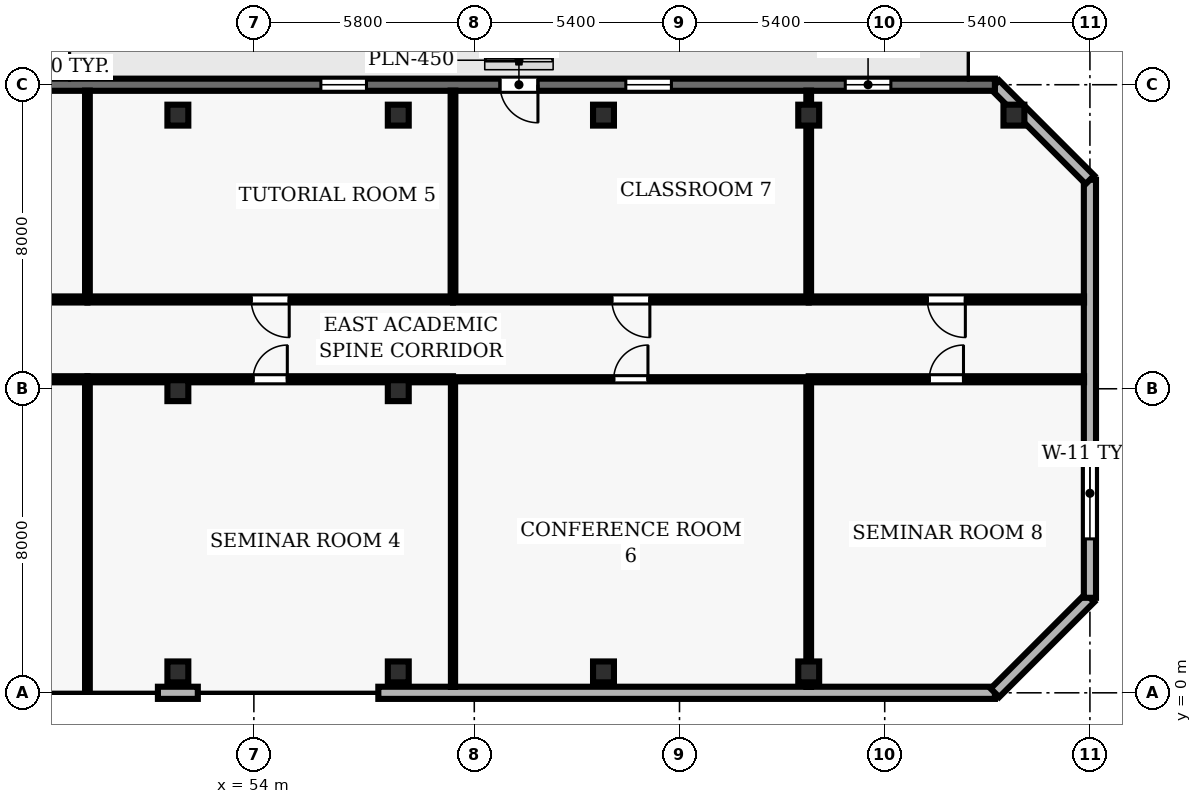
"""IFC4 building model, lengths in metres.
Left out: names, types, materials, properties, quantities, classifications, styles, units other than length and angle.
Written with IfcOpenShell. Run it as: python <this file> out.ifc"""

import sys

from ifc_helpers import new_model, si_unit, direction, frame, frame_2d, origin, origin_2d, place, context, subcontext, project, spatial, rectangle, hollow_rectangle, extrude, element, fill, save


model = new_model("IFC4")
c1 = context("Model", 3, precision=1e-05, world=origin(), true_north=direction((0.0, 1.0)))
c2 = subcontext(c1, "Body", "Model", "MODEL_VIEW")
j1 = project(units=[si_unit("LENGTHUNIT", "METRE"), si_unit("PLANEANGLEUNIT", "RADIAN")], contexts=[c1])
p1 = place(None, origin())
s1 = spatial("IfcSite", under=j1, at=p1, CompositionType="ELEMENT")
p2 = place(p1, origin())
s2 = spatial("IfcBuilding", under=s1, at=p2, CompositionType="ELEMENT")
p3 = place(p2, frame((0.0, 0.0, 85.6)))
s3 = spatial("IfcBuildingStorey", under=s2, at=p3, CompositionType="ELEMENT", Elevation=85.6)
for number, where, z_axis, x_axis in (
    (1, (52.0, 0.55, 0.0), (0.0, 0.0, 1.0), (1.0, 0.0, 0.0)),
    (2, (52.0, 7.95, 0.0), (0.0, 0.0, 1.0), (1.0, 0.0, 0.0)),
    (3, (52.0, 15.2, 0.0), (0.0, 0.0, 1.0), (1.0, 0.0, 0.0)),
    (4, (57.8, 0.55, 0.0), (0.0, 0.0, 1.0), (1.0, 0.0, 0.0)),
    (5, (57.8, 7.95, 0.0), (0.0, 0.0, 1.0), (1.0, 0.0, 0.0)),
    (6, (57.8, 15.2, 0.0), (0.0, 0.0, 1.0), (1.0, 0.0, 0.0)),
    (7, (63.2, 0.55, 0.0), (0.0, 0.0, 1.0), (1.0, 0.0, 0.0)),
    (8, (63.2, 15.2, 0.0), (0.0, 0.0, 1.0), (1.0, 0.0, 0.0)),
    (9, (68.6, 0.55, 0.0), (0.0, 0.0, 1.0), (1.0, 0.0, 0.0)),
    (10, (68.6, 15.2, 0.0), (0.0, 0.0, 1.0), (1.0, 0.0, 0.0)),
    (11, (74.0, 15.2, 0.0), (0.0, 0.0, 1.0), (1.0, 0.0, 0.0)),
):
    element("IfcColumn", number, at=place(p3, frame(where, z_axis=z_axis, x_axis=x_axis)), inside=s3, PredefinedType="COLUMN", context=c2, shape_type="SweptSolid", body=[
        extrude(hollow_rectangle(XDim=0.55, YDim=0.55, WallThickness=0.025, at=origin_2d()), origin(), (0.0, 0.0, 1.0), 3.9),
    ])
p4 = place(p3, frame((51.475, 0.0, 0.0), z_axis=(0.0, 0.0, 1.0), x_axis=(1.0, 0.0, 0.0)))
e12 = element("IfcWall", 12, at=p4, inside=s3, PredefinedType="SOLIDWALL", context=c2, shape_type="SweptSolid", body=[
    extrude(rectangle(XDim=1.05, YDim=0.32, at=frame_2d((0.525, 0.0))), origin(), (0.0, 0.0, 1.0), 3.69),
])
p5 = place(p3, frame((57.275, 0.0, 0.0), z_axis=(0.0, 0.0, 1.0), x_axis=(1.0, 0.0, 0.0)))
e13 = element("IfcWall", 13, at=p5, inside=s3, PredefinedType="SOLIDWALL", context=c2, shape_type="SweptSolid", body=[
    extrude(rectangle(XDim=16.225, YDim=0.32, at=frame_2d((8.113, 0.0))), origin(), (0.0, 0.0, 1.0), 3.69),
])
p6 = place(p3, frame((73.5, 0.0, 0.0), z_axis=(0.0, 0.0, 1.0), x_axis=(0.707106781187, 0.707106781187, 0.0)))
e14 = element("IfcWall", 14, at=p6, inside=s3, PredefinedType="SOLIDWALL", context=c2, shape_type="SweptSolid", body=[
    extrude(rectangle(XDim=3.536, YDim=0.32, at=frame_2d((1.768, 0.0))), origin(), (0.0, 0.0, 1.0), 3.69),
])
p7 = place(p3, frame((76.0, 2.5, 0.0), z_axis=(0.0, 0.0, 1.0), x_axis=(0.0, 1.0, 0.0)))
e15 = element("IfcWall", 15, at=p7, inside=s3, PredefinedType="SOLIDWALL", context=c2, shape_type="SweptSolid", body=[
    extrude(rectangle(XDim=11.0, YDim=0.32, at=frame_2d((5.5, 0.0))), origin(), (0.0, 0.0, 1.0), 3.69),
])
p8 = place(p7, frame((1.55, 0.0, 0.9)))
e16 = element("IfcOpeningElement", 16, at=p8, cuts=e15, PredefinedType="OPENING", context=c2, shape_type="SweptSolid", body=[
    extrude(rectangle(XDim=2.4, YDim=2.2, at=frame_2d((1.2, 1.1))), frame((0.0, 0.17, 0.0), z_axis=(0.0, -1.0, 0.0), x_axis=(1.0, 0.0, 0.0)), (0.0, 0.0, 1.0), 0.34),
])
p9 = place(p3, frame((76.0, 13.5, 0.0), z_axis=(0.0, 0.0, 1.0), x_axis=(-0.707106781187, 0.707106781187, 0.0)))
e17 = element("IfcWall", 17, at=p9, inside=s3, PredefinedType="SOLIDWALL", context=c2, shape_type="SweptSolid", body=[
    extrude(rectangle(XDim=3.536, YDim=0.32, at=frame_2d((1.768, 0.0))), origin(), (0.0, 0.0, 1.0), 3.69),
])
p10 = place(p3, frame((73.5, 16.0, 0.0), z_axis=(0.0, 0.0, 1.0), x_axis=(-1.0, 0.0, 0.0)))
e18 = element("IfcWall", 18, at=p10, inside=s3, PredefinedType="SOLIDWALL", context=c2, shape_type="SweptSolid", body=[
    extrude(rectangle(XDim=26.7, YDim=0.32, at=frame_2d((13.35, 0.0))), origin(), (0.0, 0.0, 1.0), 3.69),
])
p11 = place(p10, frame((12.025, 0.0, 0.0)))
e19 = element("IfcOpeningElement", 19, at=p11, cuts=e18, PredefinedType="OPENING", context=c2, shape_type="SweptSolid", body=[
    extrude(rectangle(XDim=1.0, YDim=2.2, at=frame_2d((0.5, 1.1))), frame((0.0, 0.17, 0.0), z_axis=(0.0, -1.0, 0.0), x_axis=(1.0, 0.0, 0.0)), (0.0, 0.0, 1.0), 0.34),
])
p12 = place(p10, frame((2.738, 0.0, 0.9)))
e20 = element("IfcOpeningElement", 20, at=p12, cuts=e18, PredefinedType="OPENING", context=c2, shape_type="SweptSolid", body=[
    extrude(rectangle(XDim=1.2, YDim=1.6, at=frame_2d((0.6, 0.8))), frame((0.0, 0.17, 0.0), z_axis=(0.0, -1.0, 0.0), x_axis=(1.0, 0.0, 0.0)), (0.0, 0.0, 1.0), 0.34),
])
p13 = place(p10, frame((8.513, 0.0, 0.9)))
e21 = element("IfcOpeningElement", 21, at=p13, cuts=e18, PredefinedType="OPENING", context=c2, shape_type="SweptSolid", body=[
    extrude(rectangle(XDim=1.2, YDim=1.6, at=frame_2d((0.6, 0.8))), frame((0.0, 0.17, 0.0), z_axis=(0.0, -1.0, 0.0), x_axis=(1.0, 0.0, 0.0)), (0.0, 0.0, 1.0), 0.34),
])
p14 = place(p10, frame((16.537, 0.0, 0.9)))
e22 = element("IfcOpeningElement", 22, at=p14, cuts=e18, PredefinedType="OPENING", context=c2, shape_type="SweptSolid", body=[
    extrude(rectangle(XDim=1.2, YDim=1.6, at=frame_2d((0.6, 0.8))), frame((0.0, 0.17, 0.0), z_axis=(0.0, -1.0, 0.0), x_axis=(1.0, 0.0, 0.0)), (0.0, 0.0, 1.0), 0.34),
])
p15 = place(p3, frame((40.35, 8.25, 0.0), z_axis=(0.0, 0.0, 1.0), x_axis=(1.0, 0.0, 0.0)))
e23 = element("IfcWall", 23, at=p15, inside=s3, PredefinedType="PARTITIONING", context=c2, shape_type="SweptSolid", body=[
    extrude(rectangle(XDim=9.27, YDim=0.16, at=frame_2d((4.635, 0.0))), origin(), (0.0, 0.0, 1.0), 2.995),
])
p16 = place(p15, frame((3.135, 0.0, 0.0)))
e24 = element("IfcOpeningElement", 24, at=p16, cuts=e23, PredefinedType="OPENING", context=c2, shape_type="SweptSolid", body=[
    extrude(rectangle(XDim=0.9, YDim=2.1, at=frame_2d((0.45, 1.05))), frame((0.0, 0.09, 0.0), z_axis=(0.0, -1.0, 0.0), x_axis=(1.0, 0.0, 0.0)), (0.0, 0.0, 1.0), 0.18),
])
p17 = place(p3, frame((49.62, 8.25, 0.0), z_axis=(0.0, 0.0, 1.0), x_axis=(1.0, 0.0, 0.0)))
e25 = element("IfcWall", 25, at=p17, inside=s3, PredefinedType="PARTITIONING", context=c2, shape_type="SweptSolid", body=[
    extrude(rectangle(XDim=9.62, YDim=0.16, at=frame_2d((4.81, 0.0))), origin(), (0.0, 0.0, 1.0), 2.995),
])
p18 = place(p17, frame((4.36, 0.0, 0.0)))
e26 = element("IfcOpeningElement", 26, at=p18, cuts=e25, PredefinedType="OPENING", context=c2, shape_type="SweptSolid", body=[
    extrude(rectangle(XDim=0.9, YDim=2.1, at=frame_2d((0.45, 1.05))), frame((0.0, 0.09, 0.0), z_axis=(0.0, -1.0, 0.0), x_axis=(1.0, 0.0, 0.0)), (0.0, 0.0, 1.0), 0.18),
])
p19 = place(p3, frame((49.62, 10.35, 0.0), z_axis=(0.0, 0.0, 1.0), x_axis=(-1.0, 0.0, 0.0)))
e27 = element("IfcWall", 27, at=p19, inside=s3, PredefinedType="PARTITIONING", context=c2, shape_type="SweptSolid", body=[
    extrude(rectangle(XDim=9.27, YDim=0.16, at=frame_2d((4.635, 0.0))), origin(), (0.0, 0.0, 1.0), 3.227),
])
p20 = place(p19, frame((4.135, 0.0, 0.0)))
e28 = element("IfcOpeningElement", 28, at=p20, cuts=e27, PredefinedType="OPENING", context=c2, shape_type="SweptSolid", body=[
    extrude(rectangle(XDim=1.0, YDim=2.1, at=frame_2d((0.5, 1.05))), frame((0.0, 0.09, 0.0), z_axis=(0.0, -1.0, 0.0), x_axis=(1.0, 0.0, 0.0)), (0.0, 0.0, 1.0), 0.18),
])
p21 = place(p3, frame((59.24, 8.25, 0.0), z_axis=(0.0, 0.0, 1.0), x_axis=(1.0, 0.0, 0.0)))
e29 = element("IfcWall", 29, at=p21, inside=s3, PredefinedType="MOVABLE", context=c2, shape_type="SweptSolid", body=[
    extrude(rectangle(XDim=9.36, YDim=0.11, at=frame_2d((4.68, 0.0))), origin(), (0.0, 0.0, 1.0), 3.69),
])
p22 = place(p21, frame((4.23, 0.0, 0.0)))
e30 = element("IfcOpeningElement", 30, at=p22, cuts=e29, PredefinedType="OPENING", context=c2, shape_type="SweptSolid", body=[
    extrude(rectangle(XDim=0.9, YDim=2.1, at=frame_2d((0.45, 1.05))), frame((0.0, 0.065, 0.0), z_axis=(0.0, -1.0, 0.0), x_axis=(1.0, 0.0, 0.0)), (0.0, 0.0, 1.0), 0.13),
])
p23 = place(p3, frame((59.24, 10.35, 0.0), z_axis=(0.0, 0.0, 1.0), x_axis=(-1.0, 0.0, 0.0)))
e31 = element("IfcWall", 31, at=p23, inside=s3, PredefinedType="PARTITIONING", context=c2, shape_type="SweptSolid", body=[
    extrude(rectangle(XDim=9.62, YDim=0.16, at=frame_2d((4.81, 0.0))), origin(), (0.0, 0.0, 1.0), 3.227),
])
p24 = place(p23, frame((4.31, 0.0, 0.0)))
e32 = element("IfcOpeningElement", 32, at=p24, cuts=e31, PredefinedType="OPENING", context=c2, shape_type="SweptSolid", body=[
    extrude(rectangle(XDim=1.0, YDim=2.1, at=frame_2d((0.5, 1.05))), frame((0.0, 0.09, 0.0), z_axis=(0.0, -1.0, 0.0), x_axis=(1.0, 0.0, 0.0)), (0.0, 0.0, 1.0), 0.18),
])
p25 = place(p3, frame((68.6, 8.25, 0.0), z_axis=(0.0, 0.0, 1.0), x_axis=(1.0, 0.0, 0.0)))
e33 = element("IfcWall", 33, at=p25, inside=s3, PredefinedType="PARTITIONING", context=c2, shape_type="SweptSolid", body=[
    extrude(rectangle(XDim=7.245, YDim=0.16, at=frame_2d((3.623, 0.0))), origin(), (0.0, 0.0, 1.0), 3.69),
])
p26 = place(p25, frame((3.173, 0.0, 0.0)))
e34 = element("IfcOpeningElement", 34, at=p26, cuts=e33, PredefinedType="OPENING", context=c2, shape_type="SweptSolid", body=[
    extrude(rectangle(XDim=0.9, YDim=2.1, at=frame_2d((0.45, 1.05))), frame((0.0, 0.09, 0.0), z_axis=(0.0, -1.0, 0.0), x_axis=(1.0, 0.0, 0.0)), (0.0, 0.0, 1.0), 0.18),
])
p27 = place(p3, frame((68.6, 10.35, 0.0), z_axis=(0.0, 0.0, 1.0), x_axis=(-1.0, 0.0, 0.0)))
e35 = element("IfcWall", 35, at=p27, inside=s3, PredefinedType="PARTITIONING", context=c2, shape_type="SweptSolid", body=[
    extrude(rectangle(XDim=9.36, YDim=0.16, at=frame_2d((4.68, 0.0))), origin(), (0.0, 0.0, 1.0), 3.227),
])
p28 = place(p27, frame((4.18, 0.0, 0.0)))
e36 = element("IfcOpeningElement", 36, at=p28, cuts=e35, PredefinedType="OPENING", context=c2, shape_type="SweptSolid", body=[
    extrude(rectangle(XDim=1.0, YDim=2.1, at=frame_2d((0.5, 1.05))), frame((0.0, 0.09, 0.0), z_axis=(0.0, -1.0, 0.0), x_axis=(1.0, 0.0, 0.0)), (0.0, 0.0, 1.0), 0.18),
])
p29 = place(p3, frame((75.845, 10.35, 0.0), z_axis=(0.0, 0.0, 1.0), x_axis=(-1.0, 0.0, 0.0)))
e37 = element("IfcWall", 37, at=p29, inside=s3, PredefinedType="PARTITIONING", context=c2, shape_type="SweptSolid", body=[
    extrude(rectangle(XDim=7.245, YDim=0.16, at=frame_2d((3.623, 0.0))), origin(), (0.0, 0.0, 1.0), 3.69),
])
p30 = place(p29, frame((3.123, 0.0, 0.0)))
e38 = element("IfcOpeningElement", 38, at=p30, cuts=e37, PredefinedType="OPENING", context=c2, shape_type="SweptSolid", body=[
    extrude(rectangle(XDim=1.0, YDim=2.1, at=frame_2d((0.5, 1.05))), frame((0.0, 0.09, 0.0), z_axis=(0.0, -1.0, 0.0), x_axis=(1.0, 0.0, 0.0)), (0.0, 0.0, 1.0), 0.18),
])
p31 = place(p3, frame((49.62, 0.09, 0.0), z_axis=(0.0, 0.0, 1.0), x_axis=(0.0, 1.0, 0.0)))
e39 = element("IfcWall", 39, at=p31, inside=s3, PredefinedType="PARTITIONING", context=c2, shape_type="SweptSolid", body=[
    extrude(rectangle(XDim=8.085, YDim=0.125, at=frame_2d((4.042, 0.0))), origin(), (0.0, 0.0, 1.0), 3.69),
])
p32 = place(p3, frame((49.62, 10.425, 0.0), z_axis=(0.0, 0.0, 1.0), x_axis=(0.0, 1.0, 0.0)))
e40 = element("IfcWall", 40, at=p32, inside=s3, PredefinedType="PARTITIONING", context=c2, shape_type="SweptSolid", body=[
    extrude(rectangle(XDim=5.42, YDim=0.125, at=frame_2d((2.71, 0.0))), origin(), (0.0, 0.0, 1.0), 3.69),
])
p33 = place(p3, frame((59.24, 0.155, 0.0), z_axis=(0.0, 0.0, 1.0), x_axis=(0.0, 1.0, 0.0)))
e41 = element("IfcWall", 41, at=p33, inside=s3, PredefinedType="MOVABLE", context=c2, shape_type="SweptSolid", body=[
    extrude(rectangle(XDim=8.02, YDim=0.11, at=frame_2d((4.01, 0.0))), origin(), (0.0, 0.0, 1.0), 3.69),
])
p34 = place(p3, frame((59.24, 10.425, 0.0), z_axis=(0.0, 0.0, 1.0), x_axis=(0.0, 1.0, 0.0)))
e42 = element("IfcWall", 42, at=p34, inside=s3, PredefinedType="PARTITIONING", context=c2, shape_type="SweptSolid", body=[
    extrude(rectangle(XDim=5.42, YDim=0.125, at=frame_2d((2.71, 0.0))), origin(), (0.0, 0.0, 1.0), 3.69),
])
p35 = place(p3, frame((68.6, 0.155, 0.0), z_axis=(0.0, 0.0, 1.0), x_axis=(0.0, 1.0, 0.0)))
e43 = element("IfcWall", 43, at=p35, inside=s3, PredefinedType="PARTITIONING", context=c2, shape_type="SweptSolid", body=[
    extrude(rectangle(XDim=8.02, YDim=0.125, at=frame_2d((4.01, 0.0))), origin(), (0.0, 0.0, 1.0), 2.995),
])
p36 = place(p3, frame((68.6, 10.425, 0.0), z_axis=(0.0, 0.0, 1.0), x_axis=(0.0, 1.0, 0.0)))
e44 = element("IfcWall", 44, at=p36, inside=s3, PredefinedType="PARTITIONING", context=c2, shape_type="SweptSolid", body=[
    extrude(rectangle(XDim=5.42, YDim=0.125, at=frame_2d((2.71, 0.0))), origin(), (0.0, 0.0, 1.0), 2.995),
])
p37 = place(p8, origin())
e45 = element("IfcWindow", 45, at=p37, inside=s3, PartitioningType="SINGLE_PANEL", PredefinedType="WINDOW", context=c2, shape_type="SweptSolid", body=[
    extrude(rectangle(XDim=2.4, YDim=2.2, at=frame_2d((1.2, 1.1))), frame((0.0, 0.03, 0.0), z_axis=(0.0, -1.0, 0.0), x_axis=(1.0, 0.0, 0.0)), (0.0, 0.0, 1.0), 0.06),
])
fill(e16, e45)
p38 = place(p11, origin())
e46 = element("IfcDoor", 46, at=p38, inside=s3, OperationType="SINGLE_SWING_LEFT", PredefinedType="DOOR", context=c2, shape_type="SweptSolid", body=[
    extrude(rectangle(XDim=1.0, YDim=2.2, at=frame_2d((0.5, 1.1))), frame((0.0, 0.025, 0.0), z_axis=(0.0, -1.0, 0.0), x_axis=(1.0, 0.0, 0.0)), (0.0, 0.0, 1.0), 0.05),
])
fill(e19, e46)
p39 = place(p12, origin())
e47 = element("IfcWindow", 47, at=p39, inside=s3, PartitioningType="SINGLE_PANEL", PredefinedType="WINDOW", context=c2, shape_type="SweptSolid", body=[
    extrude(rectangle(XDim=1.2, YDim=1.6, at=frame_2d((0.6, 0.8))), frame((0.0, 0.03, 0.0), z_axis=(0.0, -1.0, 0.0), x_axis=(1.0, 0.0, 0.0)), (0.0, 0.0, 1.0), 0.06),
])
fill(e20, e47)
p40 = place(p13, origin())
e48 = element("IfcWindow", 48, at=p40, inside=s3, PartitioningType="SINGLE_PANEL", PredefinedType="WINDOW", context=c2, shape_type="SweptSolid", body=[
    extrude(rectangle(XDim=1.2, YDim=1.6, at=frame_2d((0.6, 0.8))), frame((0.0, 0.03, 0.0), z_axis=(0.0, -1.0, 0.0), x_axis=(1.0, 0.0, 0.0)), (0.0, 0.0, 1.0), 0.06),
])
fill(e21, e48)
p41 = place(p14, origin())
e49 = element("IfcWindow", 49, at=p41, inside=s3, PartitioningType="SINGLE_PANEL", PredefinedType="WINDOW", context=c2, shape_type="SweptSolid", body=[
    extrude(rectangle(XDim=1.2, YDim=1.6, at=frame_2d((0.6, 0.8))), frame((0.0, 0.03, 0.0), z_axis=(0.0, -1.0, 0.0), x_axis=(1.0, 0.0, 0.0)), (0.0, 0.0, 1.0), 0.06),
])
fill(e22, e49)
p42 = place(p18, origin())
e50 = element("IfcDoor", 50, at=p42, inside=s3, OperationType="SINGLE_SWING_RIGHT", PredefinedType="DOOR", context=c2, shape_type="SweptSolid", body=[
    extrude(rectangle(XDim=0.9, YDim=2.1, at=frame_2d((0.45, 1.05))), frame((0.0, 0.025, 0.0), z_axis=(0.0, -1.0, 0.0), x_axis=(1.0, 0.0, 0.0)), (0.0, 0.0, 1.0), 0.05),
])
fill(e26, e50)
p43 = place(p24, origin())
e51 = element("IfcDoor", 51, at=p43, inside=s3, OperationType="SINGLE_SWING_LEFT", PredefinedType="DOOR", context=c2, shape_type="SweptSolid", body=[
    extrude(rectangle(XDim=1.0, YDim=2.1, at=frame_2d((0.5, 1.05))), frame((0.0, 0.025, 0.0), z_axis=(0.0, -1.0, 0.0), x_axis=(1.0, 0.0, 0.0)), (0.0, 0.0, 1.0), 0.05),
])
fill(e32, e51)
p44 = place(p22, origin())
e52 = element("IfcDoor", 52, at=p44, inside=s3, OperationType="SINGLE_SWING_RIGHT", PredefinedType="DOOR", context=c2, shape_type="SweptSolid", body=[
    extrude(rectangle(XDim=0.9, YDim=2.1, at=frame_2d((0.45, 1.05))), frame((0.0, 0.025, 0.0), z_axis=(0.0, -1.0, 0.0), x_axis=(1.0, 0.0, 0.0)), (0.0, 0.0, 1.0), 0.05),
])
fill(e30, e52)
p45 = place(p28, origin())
e53 = element("IfcDoor", 53, at=p45, inside=s3, OperationType="SINGLE_SWING_LEFT", PredefinedType="DOOR", context=c2, shape_type="SweptSolid", body=[
    extrude(rectangle(XDim=1.0, YDim=2.1, at=frame_2d((0.5, 1.05))), frame((0.0, 0.025, 0.0), z_axis=(0.0, -1.0, 0.0), x_axis=(1.0, 0.0, 0.0)), (0.0, 0.0, 1.0), 0.05),
])
fill(e36, e53)
p46 = place(p26, origin())
e54 = element("IfcDoor", 54, at=p46, inside=s3, OperationType="SINGLE_SWING_RIGHT", PredefinedType="DOOR", context=c2, shape_type="SweptSolid", body=[
    extrude(rectangle(XDim=0.9, YDim=2.1, at=frame_2d((0.45, 1.05))), frame((0.0, 0.025, 0.0), z_axis=(0.0, -1.0, 0.0), x_axis=(1.0, 0.0, 0.0)), (0.0, 0.0, 1.0), 0.05),
])
fill(e34, e54)
p47 = place(p30, origin())
e55 = element("IfcDoor", 55, at=p47, inside=s3, OperationType="SINGLE_SWING_LEFT", PredefinedType="DOOR", context=c2, shape_type="SweptSolid", body=[
    extrude(rectangle(XDim=1.0, YDim=2.1, at=frame_2d((0.5, 1.05))), frame((0.0, 0.025, 0.0), z_axis=(0.0, -1.0, 0.0), x_axis=(1.0, 0.0, 0.0)), (0.0, 0.0, 1.0), 0.05),
])
fill(e38, e55)
save(model, sys.argv[1])
